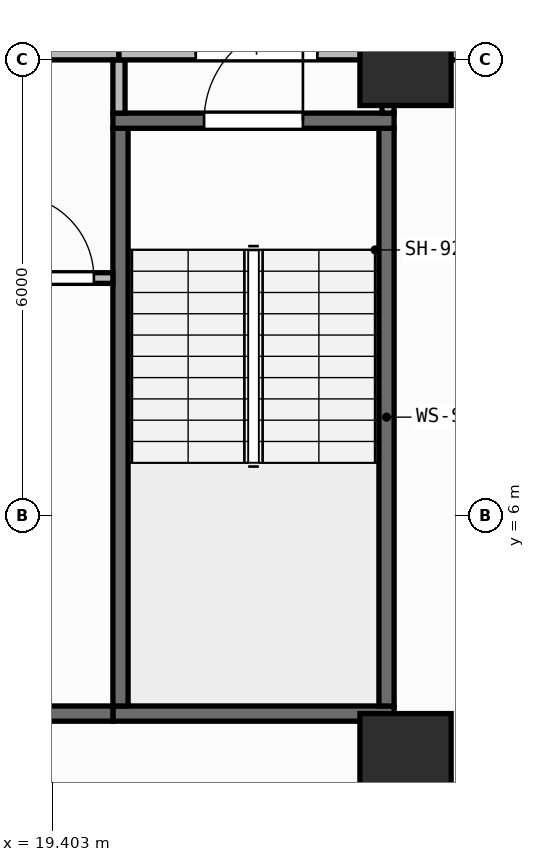
"""IFC4 building model, lengths in metres.
Left out: names, types, materials, properties, quantities, classifications, styles, units other than length and angle.
Written with IfcOpenShell. Run it as: python <this file> out.ifc"""

import sys

from ifc_helpers import new_model, si_unit, direction, frame, frame_2d, origin, origin_2d, place, context, subcontext, project, spatial, rectangle, extrude, element, fill, save


model = new_model("IFC4")
c1 = context("Model", 3, precision=1e-05, world=origin(), true_north=direction((0.0, 1.0)))
c2 = subcontext(c1, "Body", "Model", "MODEL_VIEW")
j1 = project(units=[si_unit("LENGTHUNIT", "METRE"), si_unit("PLANEANGLEUNIT", "RADIAN")], contexts=[c1])
p1 = place(None, origin())
s1 = spatial("IfcSite", under=j1, at=p1, CompositionType="ELEMENT")
p2 = place(p1, origin())
s2 = spatial("IfcBuilding", under=s1, at=p2, CompositionType="ELEMENT")
p3 = place(p2, frame((0.0, 0.0, 115.2)))
s3 = spatial("IfcBuildingStorey", under=s2, at=p3, CompositionType="ELEMENT", Elevation=115.2)
for number, where, z_axis, x_axis in (
    (1, (24.05, 2.8, 0.0), (0.0, 0.0, 1.0), (1.0, 0.0, 0.0)),
    (2, (24.05, 12.0, 0.0), (0.0, 0.0, 1.0), (1.0, 0.0, 0.0)),
):
    element("IfcColumn", number, at=place(p3, frame(where, z_axis=z_axis, x_axis=x_axis)), inside=s3, PredefinedType="COLUMN", context=c2, shape_type="SweptSolid", body=[
        extrude(rectangle(XDim=1.2, YDim=1.2, at=origin_2d()), origin(), (0.0, 0.0, 1.0), 3.95),
    ])
p4 = place(p3, frame((2.76, 0.173, 0.0), z_axis=(0.0, 0.0, 1.0), x_axis=(0.996857931723, 0.079210251617, 0.0)))
e3 = element("IfcWall", 3, at=p4, inside=s3, PredefinedType="STANDARD", context=c2, shape_type="SweptSolid", body=[
    extrude(rectangle(XDim=51.442, YDim=0.26, at=frame_2d((25.721, 0.0))), origin(), (0.0, 0.0, 1.0), 3.71),
])
p5 = place(p4, frame((24.521, 0.0, 0.9)))
e4 = element("IfcOpeningElement", 4, at=p5, cuts=e3, PredefinedType="OPENING", context=c2, shape_type="SweptSolid", body=[
    extrude(rectangle(XDim=2.4, YDim=1.65, at=frame_2d((1.2, 0.825))), frame((0.0, 0.14, 0.0), z_axis=(0.0, -1.0, 0.0), x_axis=(1.0, 0.0, 0.0)), (0.0, 0.0, 1.0), 0.28),
])
p6 = place(p3, frame((20.2, 3.4, 0.0), z_axis=(0.0, 0.0, 1.0), x_axis=(1.0, 0.0, 0.0)))
e5 = element("IfcWall", 5, at=p6, inside=s3, PredefinedType="SHEAR", context=c2, shape_type="SweptSolid", body=[
    extrude(rectangle(XDim=3.7, YDim=0.2, at=frame_2d((1.85, 0.0))), origin(), (0.0, 0.0, 1.0), 3.71),
])
for number, where, z_axis, x_axis in (
    (6, (20.3, 3.5, 0.0), (0.0, 0.0, 1.0), (0.0, 1.0, 0.0)),
    (7, (23.8, 3.5, 0.0), (0.0, 0.0, 1.0), (0.0, 1.0, 0.0)),
):
    element("IfcWall", number, at=place(p3, frame(where, z_axis=z_axis, x_axis=x_axis)), inside=s3, PredefinedType="SHEAR", context=c2, shape_type="SweptSolid", body=[
        extrude(rectangle(XDim=7.6, YDim=0.2, at=frame_2d((3.8, 0.0))), origin(), (0.0, 0.0, 1.0), 3.71),
    ])
p7 = place(p3, frame((20.2, 11.2, 0.0), z_axis=(0.0, 0.0, 1.0), x_axis=(1.0, 0.0, 0.0)))
e8 = element("IfcWall", 8, at=p7, inside=s3, PredefinedType="SHEAR", context=c2, shape_type="SweptSolid", body=[
    extrude(rectangle(XDim=3.7, YDim=0.2, at=frame_2d((1.85, 0.0))), origin(), (0.0, 0.0, 1.0), 3.71),
])
p8 = place(p7, frame((1.2, 0.0, 0.0)))
e9 = element("IfcOpeningElement", 9, at=p8, cuts=e8, PredefinedType="OPENING", context=c2, shape_type="SweptSolid", body=[
    extrude(rectangle(XDim=1.3, YDim=2.15, at=frame_2d((0.65, 1.075))), frame((0.0, 0.11, 0.0), z_axis=(0.0, -1.0, 0.0), x_axis=(1.0, 0.0, 0.0)), (0.0, 0.0, 1.0), 0.22),
])
p9 = place(p3, frame((6.5, 3.4, 0.0), z_axis=(0.0, 0.0, 1.0), x_axis=(1.0, 0.0, 0.0)))
e10 = element("IfcWall", 10, at=p9, inside=s3, PredefinedType="SHEAR", context=c2, shape_type="SweptSolid", body=[
    extrude(rectangle(XDim=13.7, YDim=0.2, at=frame_2d((6.85, 0.0))), origin(), (0.0, 0.0, 1.0), 3.71),
])
p10 = place(p3, frame((18.61, 9.13, 0.0), z_axis=(0.0, 0.0, 1.0), x_axis=(1.0, 0.0, 0.0)))
e11 = element("IfcWall", 11, at=p10, inside=s3, PredefinedType="PARTITIONING", context=c2, shape_type="SweptSolid", body=[
    extrude(rectangle(XDim=1.59, YDim=0.14, at=frame_2d((0.795, 0.0))), origin(), (0.0, 0.0, 1.0), 3.71),
])
p11 = place(p10, frame((0.24, 0.0, 0.0)))
e12 = element("IfcOpeningElement", 12, at=p11, cuts=e11, PredefinedType="OPENING", context=c2, shape_type="SweptSolid", body=[
    extrude(rectangle(XDim=1.1, YDim=2.1, at=frame_2d((0.55, 1.05))), frame((0.0, 0.08, 0.0), z_axis=(0.0, -1.0, 0.0), x_axis=(1.0, 0.0, 0.0)), (0.0, 0.0, 1.0), 0.16),
])
p12 = place(p3, frame((12.58, 12.08, 0.0), z_axis=(0.0, 0.0, 1.0), x_axis=(1.0, 0.0, 0.0)))
e13 = element("IfcWall", 13, at=p12, inside=s3, PredefinedType="PARTITIONING", context=c2, shape_type="SweptSolid", body=[
    extrude(rectangle(XDim=7.7, YDim=0.16, at=frame_2d((3.85, 0.0))), origin(), (0.0, 0.0, 1.0), 3.083),
])
p13 = place(p12, frame((3.05, 0.0, 0.0)))
e14 = element("IfcOpeningElement", 14, at=p13, cuts=e13, PredefinedType="OPENING", context=c2, shape_type="SweptSolid", body=[
    extrude(rectangle(XDim=1.6, YDim=2.05, at=frame_2d((0.8, 1.025))), frame((0.0, 0.09, 0.0), z_axis=(0.0, -1.0, 0.0), x_axis=(1.0, 0.0, 0.0)), (0.0, 0.0, 1.0), 0.18),
])
p14 = place(p3, frame((20.28, 11.3, 0.0), z_axis=(0.0, 0.0, 1.0), x_axis=(0.0, 1.0, 0.0)))
e15 = element("IfcWall", 15, at=p14, inside=s3, PredefinedType="PARTITIONING", context=c2, shape_type="SweptSolid", body=[
    extrude(rectangle(XDim=0.7, YDim=0.16, at=frame_2d((0.35, 0.0))), origin(), (0.0, 0.0, 1.0), 3.71),
])
p15 = place(p3, frame((20.28, 12.08, 0.0), z_axis=(0.0, 0.0, 1.0), x_axis=(1.0, 0.0, 0.0)))
e16 = element("IfcWall", 16, at=p15, inside=s3, PredefinedType="PARTITIONING", context=c2, shape_type="SweptSolid", body=[
    extrude(rectangle(XDim=3.62, YDim=0.16, at=frame_2d((1.81, 0.0))), origin(), (0.0, 0.0, 1.0), 3.083),
])
p16 = place(p15, frame((1.01, 0.0, 0.0)))
e17 = element("IfcOpeningElement", 17, at=p16, cuts=e16, PredefinedType="OPENING", context=c2, shape_type="SweptSolid", body=[
    extrude(rectangle(XDim=1.6, YDim=2.05, at=frame_2d((0.8, 1.025))), frame((0.0, 0.09, 0.0), z_axis=(0.0, -1.0, 0.0), x_axis=(1.0, 0.0, 0.0)), (0.0, 0.0, 1.0), 0.18),
])
p17 = place(p3, frame((23.82, 11.3, 0.0), z_axis=(0.0, 0.0, 1.0), x_axis=(0.0, 1.0, 0.0)))
e18 = element("IfcWall", 18, at=p17, inside=s3, PredefinedType="PARTITIONING", context=c2, shape_type="SweptSolid", body=[
    extrude(rectangle(XDim=0.7, YDim=0.16, at=frame_2d((0.35, 0.0))), origin(), (0.0, 0.0, 1.0), 3.71),
])
p18 = place(p3, frame((24.02, 12.08, 0.0), z_axis=(0.0, 0.0, 1.0), x_axis=(1.0, 0.0, 0.0)))
e19 = element("IfcWall", 19, at=p18, inside=s3, PredefinedType="PARTITIONING", context=c2, shape_type="SweptSolid", body=[
    extrude(rectangle(XDim=1.245, YDim=0.16, at=frame_2d((0.623, 0.0))), origin(), (0.0, 0.0, 1.0), 3.083),
])
p19 = place(p8, origin())
e20 = element("IfcDoor", 20, at=p19, inside=s3, OperationType="SINGLE_SWING_RIGHT", PredefinedType="DOOR", context=c2, shape_type="SweptSolid", body=[
    extrude(rectangle(XDim=1.3, YDim=2.15, at=frame_2d((0.65, 1.075))), frame((0.0, 0.025, 0.0), z_axis=(0.0, -1.0, 0.0), x_axis=(1.0, 0.0, 0.0)), (0.0, 0.0, 1.0), 0.05),
])
fill(e9, e20)
p20 = place(p11, origin())
e21 = element("IfcDoor", 21, at=p20, inside=s3, OperationType="SINGLE_SWING_LEFT", PredefinedType="DOOR", context=c2, shape_type="SweptSolid", body=[
    extrude(rectangle(XDim=1.1, YDim=2.1, at=frame_2d((0.55, 1.05))), frame((0.0, 0.025, 0.0), z_axis=(0.0, -1.0, 0.0), x_axis=(1.0, 0.0, 0.0)), (0.0, 0.0, 1.0), 0.05),
])
fill(e12, e21)
p21 = place(p16, origin())
e22 = element("IfcDoor", 22, at=p21, inside=s3, OperationType="DOUBLE_DOOR_SINGLE_SWING", PredefinedType="DOOR", context=c2, shape_type="SweptSolid", body=[
    extrude(rectangle(XDim=1.6, YDim=2.05, at=frame_2d((0.8, 1.025))), frame((0.0, 0.025, 0.0), z_axis=(0.0, -1.0, 0.0), x_axis=(1.0, 0.0, 0.0)), (0.0, 0.0, 1.0), 0.05),
])
fill(e17, e22)
save(model, sys.argv[1])
